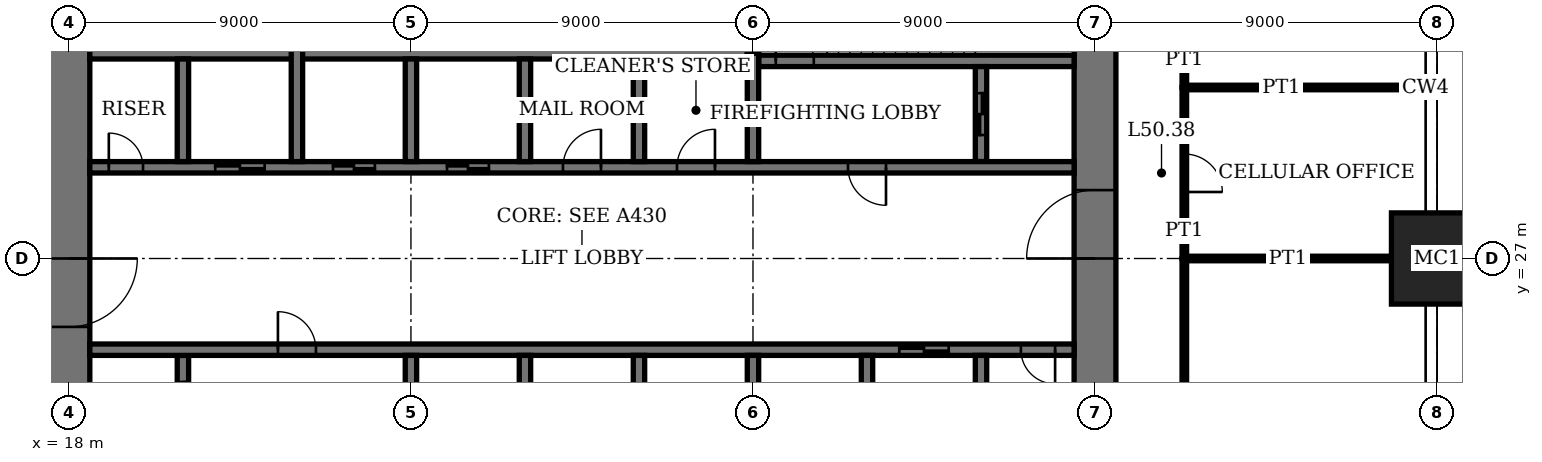
"""IFC4 building model, lengths in metres.
Left out: names, types, materials, properties, quantities, classifications, styles, units other than length and angle.
Written with IfcOpenShell. Run it as: python <this file> out.ifc"""

import sys

from ifc_helpers import new_model, si_unit, direction, frame, frame_2d, origin, origin_2d, place, context, subcontext, project, spatial, rectangle, extrude, element, fill, save


model = new_model("IFC4")
c1 = context("Model", 3, precision=1e-05, world=origin(), true_north=direction((0.0, 1.0)))
c2 = subcontext(c1, "Body", "Model", "MODEL_VIEW")
j1 = project(units=[si_unit("LENGTHUNIT", "METRE"), si_unit("PLANEANGLEUNIT", "RADIAN")], contexts=[c1])
p1 = place(None, origin())
s1 = spatial("IfcSite", under=j1, at=p1, CompositionType="ELEMENT")
p2 = place(p1, origin())
s2 = spatial("IfcBuilding", under=s1, at=p2, CompositionType="ELEMENT")
p3 = place(p2, frame((0.0, 0.0, 206.2)))
s3 = spatial("IfcBuildingStorey", under=s2, at=p3, CompositionType="ELEMENT", Elevation=206.2)
p4 = place(p3, frame((54.0, 27.0, 0.0), z_axis=(0.0, 0.0, 1.0), x_axis=(1.0, 0.0, 0.0)))
e1 = element("IfcColumn", 1, at=p4, inside=s3, PredefinedType="COLUMN", context=c2, shape_type="SweptSolid", body=[
    extrude(rectangle(XDim=2.4, YDim=2.4, at=origin_2d()), origin(), (0.0, 0.0, 1.0), 4.0),
])
p5 = place(p3, frame((18.0, 35.45, 0.0), z_axis=(0.0, 0.0, 1.0), x_axis=(0.0, -1.0, 0.0)))
e2 = element("IfcWall", 2, at=p5, inside=s3, PredefinedType="SHEAR", context=c2, shape_type="SweptSolid", body=[
    extrude(rectangle(XDim=16.9, YDim=1.1, at=frame_2d((8.45, 0.0))), origin(), (0.0, 0.0, 1.0), 4.0),
])
p6 = place(p5, frame((8.45, 0.0, 0.0)))
e3 = element("IfcOpeningElement", 3, at=p6, cuts=e2, PredefinedType="OPENING", context=c2, shape_type="SweptSolid", body=[
    extrude(rectangle(XDim=1.8, YDim=2.4, at=frame_2d((0.9, 1.2))), frame((0.0, 0.56, 0.0), z_axis=(0.0, -1.0, 0.0), x_axis=(1.0, 0.0, 0.0)), (0.0, 0.0, 1.0), 1.12),
])
p7 = place(p3, frame((45.0, 18.55, 0.0), z_axis=(0.0, 0.0, 1.0), x_axis=(0.0, 1.0, 0.0)))
e4 = element("IfcWall", 4, at=p7, inside=s3, PredefinedType="SHEAR", context=c2, shape_type="SweptSolid", body=[
    extrude(rectangle(XDim=16.9, YDim=1.1, at=frame_2d((8.45, 0.0))), origin(), (0.0, 0.0, 1.0), 4.0),
])
p8 = place(p7, frame((8.45, 0.0, 0.0)))
e5 = element("IfcOpeningElement", 5, at=p8, cuts=e4, PredefinedType="OPENING", context=c2, shape_type="SweptSolid", body=[
    extrude(rectangle(XDim=1.8, YDim=2.4, at=frame_2d((0.9, 1.2))), frame((0.0, 0.56, 0.0), z_axis=(0.0, -1.0, 0.0), x_axis=(1.0, 0.0, 0.0)), (0.0, 0.0, 1.0), 1.12),
])
p9 = place(p3, frame((36.15, 32.2, 0.0), z_axis=(0.0, 0.0, 1.0), x_axis=(1.0, 0.0, 0.0)))
e6 = element("IfcWall", 6, at=p9, inside=s3, PredefinedType="SHEAR", context=c2, shape_type="SweptSolid", body=[
    extrude(rectangle(XDim=8.3, YDim=0.3, at=frame_2d((4.15, 0.0))), origin(), (0.0, 0.0, 1.0), 4.0),
])
p10 = place(p9, frame((0.45, 0.0, 0.0)))
e7 = element("IfcOpeningElement", 7, at=p10, cuts=e6, PredefinedType="OPENING", context=c2, shape_type="SweptSolid", body=[
    extrude(rectangle(XDim=1.0, YDim=2.4, at=frame_2d((0.5, 1.2))), frame((0.0, 0.16, 0.0), z_axis=(0.0, -1.0, 0.0), x_axis=(1.0, 0.0, 0.0)), (0.0, 0.0, 1.0), 0.32),
])
p11 = place(p3, frame((36.0, 32.4, 0.0), z_axis=(0.0, 0.0, 1.0), x_axis=(0.0, 1.0, 0.0)))
e8 = element("IfcWall", 8, at=p11, inside=s3, PredefinedType="SHEAR", context=c2, shape_type="SweptSolid", body=[
    extrude(rectangle(XDim=3.05, YDim=0.3, at=frame_2d((1.525, 0.0))), origin(), (0.0, 0.0, 1.0), 4.0),
])
p12 = place(p3, frame((21.0, 21.95, 0.0), z_axis=(0.0, 0.0, 1.0), x_axis=(0.0, 1.0, 0.0)))
e9 = element("IfcWall", 9, at=p12, inside=s3, PredefinedType="SHEAR", context=c2, shape_type="SweptSolid", body=[
    extrude(rectangle(XDim=2.5, YDim=0.3, at=frame_2d((1.25, 0.0))), origin(), (0.0, 0.0, 1.0), 4.0),
])
p13 = place(p12, frame((0.7, 0.0, 0.0)))
e10 = element("IfcOpeningElement", 10, at=p13, cuts=e9, PredefinedType="OPENING", context=c2, shape_type="SweptSolid", body=[
    extrude(rectangle(XDim=1.1, YDim=2.4, at=frame_2d((0.55, 1.2))), frame((0.0, 0.16, 0.0), z_axis=(0.0, -1.0, 0.0), x_axis=(1.0, 0.0, 0.0)), (0.0, 0.0, 1.0), 0.32),
])
p14 = place(p3, frame((42.0, 29.55, 0.0), z_axis=(0.0, 0.0, 1.0), x_axis=(0.0, 1.0, 0.0)))
e11 = element("IfcWall", 11, at=p14, inside=s3, PredefinedType="SHEAR", context=c2, shape_type="SweptSolid", body=[
    extrude(rectangle(XDim=2.5, YDim=0.3, at=frame_2d((1.25, 0.0))), origin(), (0.0, 0.0, 1.0), 4.0),
])
p15 = place(p14, frame((0.7, 0.0, 0.0)))
e12 = element("IfcOpeningElement", 12, at=p15, cuts=e11, PredefinedType="OPENING", context=c2, shape_type="SweptSolid", body=[
    extrude(rectangle(XDim=1.1, YDim=2.4, at=frame_2d((0.55, 1.2))), frame((0.0, 0.16, 0.0), z_axis=(0.0, -1.0, 0.0), x_axis=(1.0, 0.0, 0.0)), (0.0, 0.0, 1.0), 0.32),
])
p16 = place(p3, frame((18.55, 24.6, 0.0), z_axis=(0.0, 0.0, 1.0), x_axis=(1.0, 0.0, 0.0)))
e13 = element("IfcWall", 13, at=p16, inside=s3, PredefinedType="SHEAR", context=c2, shape_type="SweptSolid", body=[
    extrude(rectangle(XDim=25.9, YDim=0.3, at=frame_2d((12.95, 0.0))), origin(), (0.0, 0.0, 1.0), 4.0),
])
p17 = place(p16, frame((4.95, 0.0, 0.0)))
e14 = element("IfcOpeningElement", 14, at=p17, cuts=e13, PredefinedType="OPENING", context=c2, shape_type="SweptSolid", body=[
    extrude(rectangle(XDim=1.0, YDim=2.4, at=frame_2d((0.5, 1.2))), frame((0.0, 0.16, 0.0), z_axis=(0.0, -1.0, 0.0), x_axis=(1.0, 0.0, 0.0)), (0.0, 0.0, 1.0), 0.32),
])
p18 = place(p16, frame((24.5, 0.0, 0.0)))
e15 = element("IfcOpeningElement", 15, at=p18, cuts=e13, PredefinedType="OPENING", context=c2, shape_type="SweptSolid", body=[
    extrude(rectangle(XDim=0.9, YDim=2.1, at=frame_2d((0.45, 1.05))), frame((0.0, 0.16, 0.0), z_axis=(0.0, -1.0, 0.0), x_axis=(1.0, 0.0, 0.0)), (0.0, 0.0, 1.0), 0.32),
])
p19 = place(p16, frame((21.3, 0.0, 0.0)))
e16 = element("IfcOpeningElement", 16, at=p19, cuts=e13, PredefinedType="OPENING", context=c2, shape_type="SweptSolid", body=[
    extrude(rectangle(XDim=1.3, YDim=2.4, at=frame_2d((0.65, 1.2))), frame((0.0, 0.16, 0.0), z_axis=(0.0, -1.0, 0.0), x_axis=(1.0, 0.0, 0.0)), (0.0, 0.0, 1.0), 0.32),
])
p20 = place(p3, frame((18.55, 29.4, 0.0), z_axis=(0.0, 0.0, 1.0), x_axis=(1.0, 0.0, 0.0)))
e17 = element("IfcWall", 17, at=p20, inside=s3, PredefinedType="SHEAR", context=c2, shape_type="SweptSolid", body=[
    extrude(rectangle(XDim=25.9, YDim=0.3, at=frame_2d((12.95, 0.0))), origin(), (0.0, 0.0, 1.0), 4.0),
])
p21 = place(p20, frame((19.95, 0.0, 0.0)))
e18 = element("IfcOpeningElement", 18, at=p21, cuts=e17, PredefinedType="OPENING", context=c2, shape_type="SweptSolid", body=[
    extrude(rectangle(XDim=1.0, YDim=2.4, at=frame_2d((0.5, 1.2))), frame((0.0, 0.16, 0.0), z_axis=(0.0, -1.0, 0.0), x_axis=(1.0, 0.0, 0.0)), (0.0, 0.0, 1.0), 0.32),
])
p22 = place(p20, frame((0.5, 0.0, 0.0)))
e19 = element("IfcOpeningElement", 19, at=p22, cuts=e17, PredefinedType="OPENING", context=c2, shape_type="SweptSolid", body=[
    extrude(rectangle(XDim=0.9, YDim=2.1, at=frame_2d((0.45, 1.05))), frame((0.0, 0.16, 0.0), z_axis=(0.0, -1.0, 0.0), x_axis=(1.0, 0.0, 0.0)), (0.0, 0.0, 1.0), 0.32),
])
p23 = place(p20, frame((15.45, 0.0, 0.0)))
e20 = element("IfcOpeningElement", 20, at=p23, cuts=e17, PredefinedType="OPENING", context=c2, shape_type="SweptSolid", body=[
    extrude(rectangle(XDim=1.0, YDim=2.4, at=frame_2d((0.5, 1.2))), frame((0.0, 0.16, 0.0), z_axis=(0.0, -1.0, 0.0), x_axis=(1.0, 0.0, 0.0)), (0.0, 0.0, 1.0), 0.32),
])
p24 = place(p20, frame((12.45, 0.0, 0.0)))
e21 = element("IfcOpeningElement", 21, at=p24, cuts=e17, PredefinedType="OPENING", context=c2, shape_type="SweptSolid", body=[
    extrude(rectangle(XDim=1.0, YDim=2.4, at=frame_2d((0.5, 1.2))), frame((0.0, 0.16, 0.0), z_axis=(0.0, -1.0, 0.0), x_axis=(1.0, 0.0, 0.0)), (0.0, 0.0, 1.0), 0.32),
])
p25 = place(p20, frame((9.4, 0.0, 0.0)))
e22 = element("IfcOpeningElement", 22, at=p25, cuts=e17, PredefinedType="OPENING", context=c2, shape_type="SweptSolid", body=[
    extrude(rectangle(XDim=1.1, YDim=2.4, at=frame_2d((0.55, 1.2))), frame((0.0, 0.16, 0.0), z_axis=(0.0, -1.0, 0.0), x_axis=(1.0, 0.0, 0.0)), (0.0, 0.0, 1.0), 0.32),
])
p26 = place(p20, frame((6.4, 0.0, 0.0)))
e23 = element("IfcOpeningElement", 23, at=p26, cuts=e17, PredefinedType="OPENING", context=c2, shape_type="SweptSolid", body=[
    extrude(rectangle(XDim=1.1, YDim=2.4, at=frame_2d((0.55, 1.2))), frame((0.0, 0.16, 0.0), z_axis=(0.0, -1.0, 0.0), x_axis=(1.0, 0.0, 0.0)), (0.0, 0.0, 1.0), 0.32),
])
p27 = place(p20, frame((3.3, 0.0, 0.0)))
e24 = element("IfcOpeningElement", 24, at=p27, cuts=e17, PredefinedType="OPENING", context=c2, shape_type="SweptSolid", body=[
    extrude(rectangle(XDim=1.3, YDim=2.4, at=frame_2d((0.65, 1.2))), frame((0.0, 0.16, 0.0), z_axis=(0.0, -1.0, 0.0), x_axis=(1.0, 0.0, 0.0)), (0.0, 0.0, 1.0), 0.32),
])
p28 = place(p3, frame((18.55, 32.4, 0.0), z_axis=(0.0, 0.0, 1.0), x_axis=(1.0, 0.0, 0.0)))
e25 = element("IfcWall", 25, at=p28, inside=s3, PredefinedType="SHEAR", context=c2, shape_type="SweptSolid", body=[
    extrude(rectangle(XDim=17.3, YDim=0.3, at=frame_2d((8.65, 0.0))), origin(), (0.0, 0.0, 1.0), 4.0),
])
for number, where, z_axis, x_axis in (
    (26, (30.0, 21.75, 0.0), (0.0, 0.0, 1.0), (0.0, 1.0, 0.0)),
    (27, (33.0, 29.55, 0.0), (0.0, 0.0, 1.0), (0.0, 1.0, 0.0)),
    (28, (33.0, 21.75, 0.0), (0.0, 0.0, 1.0), (0.0, 1.0, 0.0)),
    (29, (30.0, 29.55, 0.0), (0.0, 0.0, 1.0), (0.0, 1.0, 0.0)),
    (30, (36.0, 21.75, 0.0), (0.0, 0.0, 1.0), (0.0, 1.0, 0.0)),
    (31, (27.0, 29.55, 0.0), (0.0, 0.0, 1.0), (0.0, 1.0, 0.0)),
):
    element("IfcWall", number, at=place(p3, frame(where, z_axis=z_axis, x_axis=x_axis)), inside=s3, PredefinedType="SHEAR", context=c2, shape_type="SweptSolid", body=[
        extrude(rectangle(XDim=2.7, YDim=0.3, at=frame_2d((1.35, 0.0))), origin(), (0.0, 0.0, 1.0), 4.0),
    ])
for number, where, z_axis, x_axis in (
    (32, (39.0, 18.55, 0.0), (0.0, 0.0, 1.0), (0.0, 1.0, 0.0)),
    (33, (24.0, 29.55, 0.0), (0.0, 0.0, 1.0), (0.0, 1.0, 0.0)),
):
    element("IfcWall", number, at=place(p3, frame(where, z_axis=z_axis, x_axis=x_axis)), inside=s3, PredefinedType="SHEAR", context=c2, shape_type="SweptSolid", body=[
        extrude(rectangle(XDim=5.9, YDim=0.3, at=frame_2d((2.95, 0.0))), origin(), (0.0, 0.0, 1.0), 4.0),
    ])
for number, where, z_axis, x_axis in (
    (34, (42.0, 21.75, 0.0), (0.0, 0.0, 1.0), (0.0, 1.0, 0.0)),
    (35, (21.0, 29.55, 0.0), (0.0, 0.0, 1.0), (0.0, 1.0, 0.0)),
):
    element("IfcWall", number, at=place(p3, frame(where, z_axis=z_axis, x_axis=x_axis)), inside=s3, PredefinedType="SHEAR", context=c2, shape_type="SweptSolid", body=[
        extrude(rectangle(XDim=2.7, YDim=0.3, at=frame_2d((1.35, 0.0))), origin(), (0.0, 0.0, 1.0), 4.0),
    ])
for number, where, z_axis, x_axis in (
    (36, (27.0, 21.6, 0.0), (0.0, 0.0, 1.0), (0.0, 1.0, 0.0)),
    (37, (36.0, 29.55, 0.0), (0.0, 0.0, 1.0), (0.0, 1.0, 0.0)),
):
    element("IfcWall", number, at=place(p3, frame(where, z_axis=z_axis, x_axis=x_axis)), inside=s3, PredefinedType="SHEAR", context=c2, shape_type="SweptSolid", body=[
        extrude(rectangle(XDim=2.85, YDim=0.3, at=frame_2d((1.425, 0.0))), origin(), (0.0, 0.0, 1.0), 4.0),
    ])
p29 = place(p3, frame((47.35, 27.0, 0.0), z_axis=(0.0, 0.0, 1.0), x_axis=(1.0, 0.0, 0.0)))
e38 = element("IfcWall", 38, at=p29, inside=s3, PredefinedType="PARTITIONING", context=c2, shape_type="SweptSolid", body=[
    extrude(rectangle(XDim=5.45, YDim=0.12, at=frame_2d((2.725, 0.0))), origin(), (0.0, 0.0, 1.0), 3.05),
])
p30 = place(p3, frame((47.35, 31.5, 0.0), z_axis=(0.0, 0.0, 1.0), x_axis=(1.0, 0.0, 0.0)))
e39 = element("IfcWall", 39, at=p30, inside=s3, PredefinedType="PARTITIONING", context=c2, shape_type="SweptSolid", body=[
    extrude(rectangle(XDim=6.34, YDim=0.12, at=frame_2d((3.17, 0.0))), origin(), (0.0, 0.0, 1.0), 3.1),
])
p31 = place(p3, frame((47.35, 9.0, 0.0), z_axis=(0.0, 0.0, 1.0), x_axis=(0.0, 1.0, 0.0)))
e40 = element("IfcWall", 40, at=p31, inside=s3, PredefinedType="PARTITIONING", context=c2, shape_type="SweptSolid", body=[
    extrude(rectangle(XDim=18.0, YDim=0.12, at=frame_2d((9.0, 0.0))), origin(), (0.0, 0.0, 1.0), 3.75),
])
p32 = place(p31, frame((8.1, 0.0, 0.0)))
e41 = element("IfcOpeningElement", 41, at=p32, cuts=e40, PredefinedType="OPENING", context=c2, shape_type="SweptSolid", body=[
    extrude(rectangle(XDim=1.8, YDim=2.4, at=frame_2d((0.9, 1.2))), frame((0.0, 0.07, 0.0), z_axis=(0.0, -1.0, 0.0), x_axis=(1.0, 0.0, 0.0)), (0.0, 0.0, 1.0), 0.14),
])
p33 = place(p3, frame((47.35, 27.0, 0.0), z_axis=(0.0, 0.0, 1.0), x_axis=(0.0, 1.0, 0.0)))
e42 = element("IfcWall", 42, at=p33, inside=s3, PredefinedType="PARTITIONING", context=c2, shape_type="SweptSolid", body=[
    extrude(rectangle(XDim=4.5, YDim=0.12, at=frame_2d((2.25, 0.0))), origin(), (0.0, 0.0, 1.0), 3.75),
])
p34 = place(p33, frame((1.75, 0.0, 0.0)))
e43 = element("IfcOpeningElement", 43, at=p34, cuts=e42, PredefinedType="OPENING", context=c2, shape_type="SweptSolid", body=[
    extrude(rectangle(XDim=1.0, YDim=2.4, at=frame_2d((0.5, 1.2))), frame((0.0, 0.07, 0.0), z_axis=(0.0, -1.0, 0.0), x_axis=(1.0, 0.0, 0.0)), (0.0, 0.0, 1.0), 0.14),
])
p35 = place(p3, frame((47.35, 31.5, 0.0), z_axis=(0.0, 0.0, 1.0), x_axis=(0.0, 1.0, 0.0)))
e44 = element("IfcWall", 44, at=p35, inside=s3, PredefinedType="PARTITIONING", context=c2, shape_type="SweptSolid", body=[
    extrude(rectangle(XDim=4.5, YDim=0.12, at=frame_2d((2.25, 0.0))), origin(), (0.0, 0.0, 1.0), 3.75),
])
p36 = place(p35, frame((1.75, 0.0, 0.0)))
e45 = element("IfcOpeningElement", 45, at=p36, cuts=e44, PredefinedType="OPENING", context=c2, shape_type="SweptSolid", body=[
    extrude(rectangle(XDim=1.0, YDim=2.4, at=frame_2d((0.5, 1.2))), frame((0.0, 0.07, 0.0), z_axis=(0.0, -1.0, 0.0), x_axis=(1.0, 0.0, 0.0)), (0.0, 0.0, 1.0), 0.14),
])
p37 = place(p6, origin())
e46 = element("IfcDoor", 46, at=p37, inside=s3, OperationType="DOUBLE_DOOR_DOUBLE_SWING", PredefinedType="DOOR", context=c2, shape_type="SweptSolid", body=[
    extrude(rectangle(XDim=1.8, YDim=2.4, at=frame_2d((0.9, 1.2))), frame((0.0, 0.03, 0.0), z_axis=(0.0, -1.0, 0.0), x_axis=(1.0, 0.0, 0.0)), (0.0, 0.0, 1.0), 0.06),
    extrude(rectangle(XDim=0.04, YDim=2.4, at=frame_2d((0.02, 1.2))), frame((0.0, 0.55, 0.0), z_axis=(0.0, -1.0, 0.0), x_axis=(1.0, 0.0, 0.0)), (0.0, 0.0, 1.0), 1.1),
    extrude(rectangle(XDim=0.04, YDim=2.4, at=frame_2d((1.78, 1.2))), frame((0.0, 0.55, 0.0), z_axis=(0.0, -1.0, 0.0), x_axis=(1.0, 0.0, 0.0)), (0.0, 0.0, 1.0), 1.1),
    extrude(rectangle(XDim=1.8, YDim=0.04, at=frame_2d((0.9, 2.38))), frame((0.0, 0.55, 0.0), z_axis=(0.0, -1.0, 0.0), x_axis=(1.0, 0.0, 0.0)), (0.0, 0.0, 1.0), 1.1),
])
fill(e3, e46)
p38 = place(p8, origin())
e47 = element("IfcDoor", 47, at=p38, inside=s3, OperationType="DOUBLE_DOOR_DOUBLE_SWING", PredefinedType="DOOR", context=c2, shape_type="SweptSolid", body=[
    extrude(rectangle(XDim=1.8, YDim=2.4, at=frame_2d((0.9, 1.2))), frame((0.0, 0.03, 0.0), z_axis=(0.0, -1.0, 0.0), x_axis=(1.0, 0.0, 0.0)), (0.0, 0.0, 1.0), 0.06),
    extrude(rectangle(XDim=0.04, YDim=2.4, at=frame_2d((0.02, 1.2))), frame((0.0, 0.55, 0.0), z_axis=(0.0, -1.0, 0.0), x_axis=(1.0, 0.0, 0.0)), (0.0, 0.0, 1.0), 1.1),
    extrude(rectangle(XDim=0.04, YDim=2.4, at=frame_2d((1.78, 1.2))), frame((0.0, 0.55, 0.0), z_axis=(0.0, -1.0, 0.0), x_axis=(1.0, 0.0, 0.0)), (0.0, 0.0, 1.0), 1.1),
    extrude(rectangle(XDim=1.8, YDim=0.04, at=frame_2d((0.9, 2.38))), frame((0.0, 0.55, 0.0), z_axis=(0.0, -1.0, 0.0), x_axis=(1.0, 0.0, 0.0)), (0.0, 0.0, 1.0), 1.1),
])
fill(e5, e47)
p39 = place(p10, origin())
e48 = element("IfcDoor", 48, at=p39, inside=s3, OperationType="SINGLE_SWING_RIGHT", PredefinedType="DOOR", context=c2, shape_type="SweptSolid", body=[
    extrude(rectangle(XDim=1.0, YDim=2.4, at=frame_2d((0.5, 1.2))), frame((0.0, 0.03, 0.0), z_axis=(0.0, -1.0, 0.0), x_axis=(1.0, 0.0, 0.0)), (0.0, 0.0, 1.0), 0.06),
])
fill(e7, e48)
p40 = place(p17, origin())
e49 = element("IfcDoor", 49, at=p40, inside=s3, OperationType="SINGLE_SWING_RIGHT", PredefinedType="DOOR", context=c2, shape_type="SweptSolid", body=[
    extrude(rectangle(XDim=1.0, YDim=2.4, at=frame_2d((0.5, 1.2))), frame((0.0, 0.03, 0.0), z_axis=(0.0, -1.0, 0.0), x_axis=(1.0, 0.0, 0.0)), (0.0, 0.0, 1.0), 0.06),
])
fill(e14, e49)
p41 = place(p21, origin())
e50 = element("IfcDoor", 50, at=p41, inside=s3, OperationType="SINGLE_SWING_RIGHT", PredefinedType="DOOR", context=c2, shape_type="SweptSolid", body=[
    extrude(rectangle(XDim=1.0, YDim=2.4, at=frame_2d((0.5, 1.2))), frame((0.0, 0.03, 0.0), z_axis=(0.0, -1.0, 0.0), x_axis=(1.0, 0.0, 0.0)), (0.0, 0.0, 1.0), 0.06),
])
fill(e18, e50)
p42 = place(p18, origin())
e51 = element("IfcDoor", 51, at=p42, inside=s3, OperationType="SINGLE_SWING_RIGHT", PredefinedType="DOOR", context=c2, shape_type="SweptSolid", body=[
    extrude(rectangle(XDim=0.9, YDim=2.1, at=frame_2d((0.45, 1.05))), frame((0.0, 0.03, 0.0), z_axis=(0.0, -1.0, 0.0), x_axis=(1.0, 0.0, 0.0)), (0.0, 0.0, 1.0), 0.06),
])
fill(e15, e51)
p43 = place(p22, origin())
e52 = element("IfcDoor", 52, at=p43, inside=s3, OperationType="SINGLE_SWING_RIGHT", PredefinedType="DOOR", context=c2, shape_type="SweptSolid", body=[
    extrude(rectangle(XDim=0.9, YDim=2.1, at=frame_2d((0.45, 1.05))), frame((0.0, 0.03, 0.0), z_axis=(0.0, -1.0, 0.0), x_axis=(1.0, 0.0, 0.0)), (0.0, 0.0, 1.0), 0.06),
])
fill(e19, e52)
p44 = place(p34, origin())
e53 = element("IfcDoor", 53, at=p44, inside=s3, OperationType="SINGLE_SWING_LEFT", PredefinedType="DOOR", context=c2, shape_type="SweptSolid", body=[
    extrude(rectangle(XDim=1.0, YDim=2.4, at=frame_2d((0.5, 1.2))), frame((0.0, 0.025, 0.0), z_axis=(0.0, -1.0, 0.0), x_axis=(1.0, 0.0, 0.0)), (0.0, 0.0, 1.0), 0.05),
])
fill(e43, e53)
p45 = place(p23, origin())
e54 = element("IfcDoor", 54, at=p45, inside=s3, OperationType="SINGLE_SWING_LEFT", PredefinedType="DOOR", context=c2, shape_type="SweptSolid", body=[
    extrude(rectangle(XDim=1.0, YDim=2.4, at=frame_2d((0.5, 1.2))), frame((0.0, 0.03, 0.0), z_axis=(0.0, -1.0, 0.0), x_axis=(1.0, 0.0, 0.0)), (0.0, 0.0, 1.0), 0.06),
])
fill(e20, e54)
p46 = place(p24, origin())
e55 = element("IfcDoor", 55, at=p46, inside=s3, OperationType="SINGLE_SWING_LEFT", PredefinedType="DOOR", context=c2, shape_type="SweptSolid", body=[
    extrude(rectangle(XDim=1.0, YDim=2.4, at=frame_2d((0.5, 1.2))), frame((0.0, 0.03, 0.0), z_axis=(0.0, -1.0, 0.0), x_axis=(1.0, 0.0, 0.0)), (0.0, 0.0, 1.0), 0.06),
])
fill(e21, e55)
p47 = place(p25, origin())
e56 = element("IfcDoor", 56, at=p47, inside=s3, OperationType="DOUBLE_DOOR_SLIDING", PredefinedType="DOOR", context=c2, shape_type="SweptSolid", body=[
    extrude(rectangle(XDim=1.1, YDim=2.4, at=frame_2d((0.55, 1.2))), frame((0.0, 0.02, 0.0), z_axis=(0.0, -1.0, 0.0), x_axis=(1.0, 0.0, 0.0)), (0.0, 0.0, 1.0), 0.04),
])
fill(e22, e56)
p48 = place(p26, origin())
e57 = element("IfcDoor", 57, at=p48, inside=s3, OperationType="DOUBLE_DOOR_SLIDING", PredefinedType="DOOR", context=c2, shape_type="SweptSolid", body=[
    extrude(rectangle(XDim=1.1, YDim=2.4, at=frame_2d((0.55, 1.2))), frame((0.0, 0.02, 0.0), z_axis=(0.0, -1.0, 0.0), x_axis=(1.0, 0.0, 0.0)), (0.0, 0.0, 1.0), 0.04),
])
fill(e23, e57)
p49 = place(p19, origin())
e58 = element("IfcDoor", 58, at=p49, inside=s3, OperationType="DOUBLE_DOOR_SLIDING", PredefinedType="DOOR", context=c2, shape_type="SweptSolid", body=[
    extrude(rectangle(XDim=1.3, YDim=2.4, at=frame_2d((0.65, 1.2))), frame((0.0, 0.02, 0.0), z_axis=(0.0, -1.0, 0.0), x_axis=(1.0, 0.0, 0.0)), (0.0, 0.0, 1.0), 0.04),
])
fill(e16, e58)
p50 = place(p27, origin())
e59 = element("IfcDoor", 59, at=p50, inside=s3, OperationType="DOUBLE_DOOR_SLIDING", PredefinedType="DOOR", context=c2, shape_type="SweptSolid", body=[
    extrude(rectangle(XDim=1.3, YDim=2.4, at=frame_2d((0.65, 1.2))), frame((0.0, 0.02, 0.0), z_axis=(0.0, -1.0, 0.0), x_axis=(1.0, 0.0, 0.0)), (0.0, 0.0, 1.0), 0.04),
])
fill(e24, e59)
p51 = place(p15, origin())
e60 = element("IfcDoor", 60, at=p51, inside=s3, OperationType="DOUBLE_DOOR_SLIDING", PredefinedType="DOOR", context=c2, shape_type="SweptSolid", body=[
    extrude(rectangle(XDim=1.1, YDim=2.4, at=frame_2d((0.55, 1.2))), frame((0.0, 0.03, 0.0), z_axis=(0.0, -1.0, 0.0), x_axis=(1.0, 0.0, 0.0)), (0.0, 0.0, 1.0), 0.06),
])
fill(e12, e60)
save(model, sys.argv[1])
